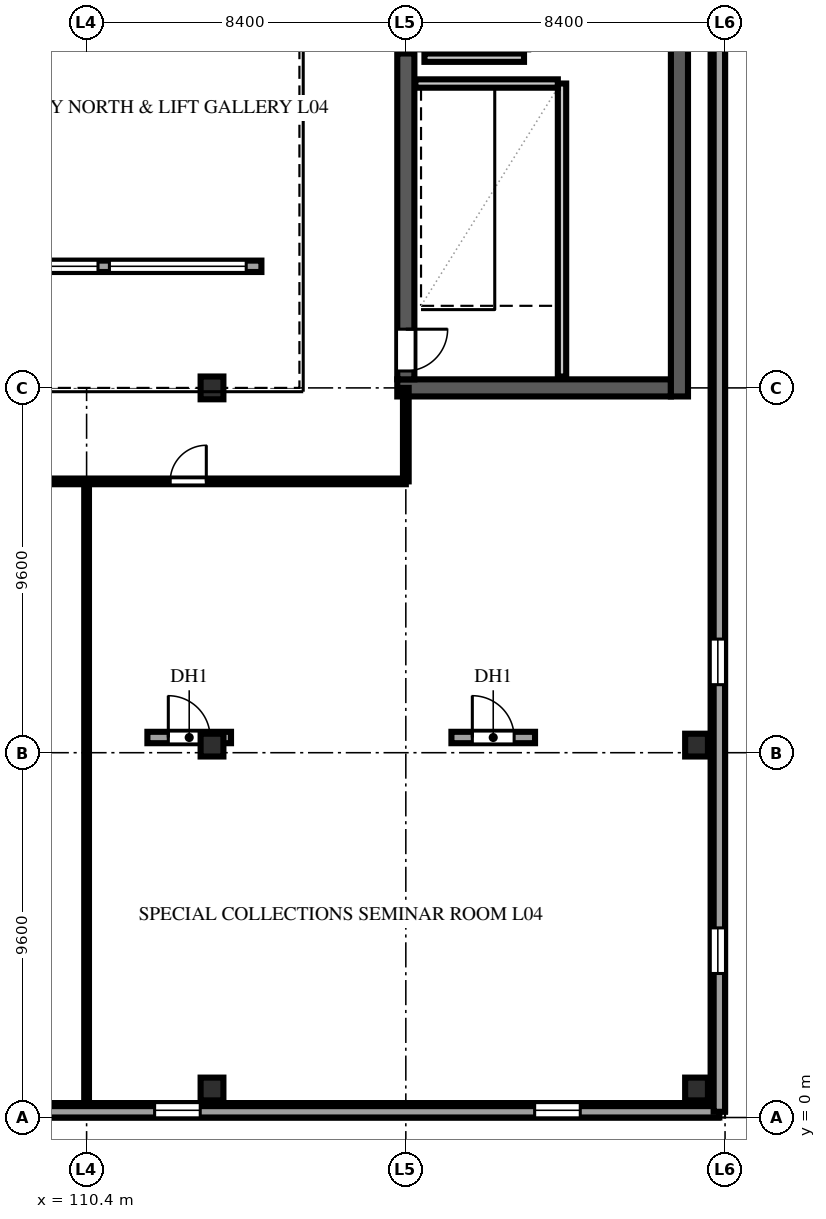
"""IFC4 building model, lengths in metres.
Left out: names, types, materials, properties, quantities, classifications, styles, units other than length and angle.
Written with IfcOpenShell. Run it as: python <this file> out.ifc"""

import sys

from ifc_helpers import new_model, si_unit, direction, frame, frame_2d, origin, origin_2d, place, context, subcontext, project, spatial, rectangle, extrude, element, fill, save


model = new_model("IFC4")
c1 = context("Model", 3, precision=1e-05, world=origin(), true_north=direction((0.0, 1.0)))
c2 = subcontext(c1, "Body", "Model", "MODEL_VIEW")
j1 = project(units=[si_unit("LENGTHUNIT", "METRE"), si_unit("PLANEANGLEUNIT", "RADIAN")], contexts=[c1])
p1 = place(None, origin())
s1 = spatial("IfcSite", under=j1, at=p1, CompositionType="ELEMENT")
p2 = place(p1, origin())
s2 = spatial("IfcBuilding", under=s1, at=p2, CompositionType="ELEMENT")
p3 = place(p2, frame((0.0, 0.0, 19.6)))
s3 = spatial("IfcBuildingStorey", under=s2, at=p3, CompositionType="ELEMENT", Elevation=19.6)
p4 = place(p3, frame((118.575, 19.2, 0.0), z_axis=(0.0, 0.0, 1.0), x_axis=(1.0, 0.0, 0.0)))
e1 = element("IfcWall", 1, at=p4, inside=s3, PredefinedType="SHEAR", context=c2, shape_type="SweptSolid", body=[
    extrude(rectangle(XDim=7.2, YDim=0.45, at=frame_2d((3.6, 0.0))), origin(), (0.0, 0.0, 1.0), 4.32),
])
p5 = place(p3, frame((126.0, 18.975, 0.0), z_axis=(0.0, 0.0, 1.0), x_axis=(0.0, 1.0, 0.0)))
e2 = element("IfcWall", 2, at=p5, inside=s3, PredefinedType="SHEAR", context=c2, shape_type="SweptSolid", body=[
    extrude(rectangle(XDim=19.65, YDim=0.45, at=frame_2d((9.825, 0.0))), origin(), (0.0, 0.0, 1.0), 4.32),
])
p6 = place(p3, frame((118.8, 19.425, 0.0), z_axis=(0.0, 0.0, 1.0), x_axis=(0.0, 1.0, 0.0)))
e3 = element("IfcWall", 3, at=p6, inside=s3, PredefinedType="SHEAR", context=c2, shape_type="SweptSolid", body=[
    extrude(rectangle(XDim=8.575, YDim=0.45, at=frame_2d((4.288, 0.0))), origin(), (0.0, 0.0, 1.0), 4.32),
])
p7 = place(p6, frame((0.22, 0.0, 0.0)))
e4 = element("IfcOpeningElement", 4, at=p7, cuts=e3, PredefinedType="OPENING", context=c2, shape_type="SweptSolid", body=[
    extrude(rectangle(XDim=1.1, YDim=2.2, at=frame_2d((0.55, 1.1))), frame((0.0, 0.237, 0.0), z_axis=(0.0, -1.0, 0.0), x_axis=(1.0, 0.0, 0.0)), (0.0, 0.0, 1.0), 0.474),
])
for number, where, z_axis, x_axis in (
    (5, (113.7, 0.75, 0.0), (0.0, 0.0, 1.0), (1.0, 0.0, 0.0)),
    (6, (113.7, 9.8, 0.0), (0.0, 0.0, 1.0), (1.0, 0.0, 0.0)),
    (7, (113.7, 19.2, 0.0), (0.0, 0.0, 1.0), (1.0, 0.0, 0.0)),
    (8, (126.45, 0.75, 0.0), (0.0, 0.0, 1.0), (1.0, 0.0, 0.0)),
    (9, (126.45, 9.8, 0.0), (0.0, 0.0, 1.0), (1.0, 0.0, 0.0)),
):
    element("IfcColumn", number, at=place(p3, frame(where, z_axis=z_axis, x_axis=x_axis)), inside=s3, PredefinedType="COLUMN", context=c2, shape_type="SweptSolid", body=[
        extrude(rectangle(XDim=0.6, YDim=0.6, at=origin_2d()), origin(), (0.0, 0.0, 1.0), 4.32),
    ])
p8 = place(p3, frame((85.39, 0.19, 0.0), z_axis=(0.0, 0.0, 1.0), x_axis=(1.0, 0.0, 0.0)))
e10 = element("IfcWall", 10, at=p8, inside=s3, PredefinedType="SOLIDWALL", context=c2, shape_type="SweptSolid", body=[
    extrude(rectangle(XDim=41.62, YDim=0.38, at=frame_2d((20.81, 0.0))), origin(), (0.0, 0.0, 1.0), 4.32),
])
p9 = place(p8, frame((5.0, 0.0, 1.25)))
e11 = element("IfcOpeningElement", 11, at=p9, cuts=e10, PredefinedType="OPENING", context=c2, shape_type="SweptSolid", body=[
    extrude(rectangle(XDim=1.2, YDim=1.65, at=frame_2d((0.6, 0.825))), frame((0.0, 0.202, 0.0), z_axis=(0.0, -1.0, 0.0), x_axis=(1.0, 0.0, 0.0)), (0.0, 0.0, 1.0), 0.404),
])
p10 = place(p8, frame((11.8, 0.0, 1.25)))
e12 = element("IfcOpeningElement", 12, at=p10, cuts=e10, PredefinedType="OPENING", context=c2, shape_type="SweptSolid", body=[
    extrude(rectangle(XDim=1.2, YDim=1.65, at=frame_2d((0.6, 0.825))), frame((0.0, 0.202, 0.0), z_axis=(0.0, -1.0, 0.0), x_axis=(1.0, 0.0, 0.0)), (0.0, 0.0, 1.0), 0.404),
])
p11 = place(p8, frame((20.2, 0.0, 1.25)))
e13 = element("IfcOpeningElement", 13, at=p11, cuts=e10, PredefinedType="OPENING", context=c2, shape_type="SweptSolid", body=[
    extrude(rectangle(XDim=1.2, YDim=1.65, at=frame_2d((0.6, 0.825))), frame((0.0, 0.202, 0.0), z_axis=(0.0, -1.0, 0.0), x_axis=(1.0, 0.0, 0.0)), (0.0, 0.0, 1.0), 0.404),
])
p12 = place(p8, frame((26.8, 0.0, 1.25)))
e14 = element("IfcOpeningElement", 14, at=p12, cuts=e10, PredefinedType="OPENING", context=c2, shape_type="SweptSolid", body=[
    extrude(rectangle(XDim=1.2, YDim=1.65, at=frame_2d((0.6, 0.825))), frame((0.0, 0.202, 0.0), z_axis=(0.0, -1.0, 0.0), x_axis=(1.0, 0.0, 0.0)), (0.0, 0.0, 1.0), 0.404),
])
p13 = place(p8, frame((36.8, 0.0, 1.25)))
e15 = element("IfcOpeningElement", 15, at=p13, cuts=e10, PredefinedType="OPENING", context=c2, shape_type="SweptSolid", body=[
    extrude(rectangle(XDim=1.2, YDim=1.65, at=frame_2d((0.6, 0.825))), frame((0.0, 0.202, 0.0), z_axis=(0.0, -1.0, 0.0), x_axis=(1.0, 0.0, 0.0)), (0.0, 0.0, 1.0), 0.404),
])
p14 = place(p3, frame((127.01, 0.19, 0.0), z_axis=(0.0, 0.0, 1.0), x_axis=(0.0, 1.0, 0.0)))
e16 = element("IfcWall", 16, at=p14, inside=s3, PredefinedType="SOLIDWALL", context=c2, shape_type="SweptSolid", body=[
    extrude(rectangle(XDim=57.22, YDim=0.38, at=frame_2d((28.61, 0.0))), origin(), (0.0, 0.0, 1.0), 4.32),
])
p15 = place(p14, frame((3.6, 0.0, 1.25)))
e17 = element("IfcOpeningElement", 17, at=p15, cuts=e16, PredefinedType="OPENING", context=c2, shape_type="SweptSolid", body=[
    extrude(rectangle(XDim=1.2, YDim=1.65, at=frame_2d((0.6, 0.825))), frame((0.0, 0.202, 0.0), z_axis=(0.0, -1.0, 0.0), x_axis=(1.0, 0.0, 0.0)), (0.0, 0.0, 1.0), 0.404),
])
p16 = place(p14, frame((11.2, 0.0, 1.25)))
e18 = element("IfcOpeningElement", 18, at=p16, cuts=e16, PredefinedType="OPENING", context=c2, shape_type="SweptSolid", body=[
    extrude(rectangle(XDim=1.2, YDim=1.65, at=frame_2d((0.6, 0.825))), frame((0.0, 0.202, 0.0), z_axis=(0.0, -1.0, 0.0), x_axis=(1.0, 0.0, 0.0)), (0.0, 0.0, 1.0), 0.404),
])
p17 = place(p14, frame((41.6, 0.0, 1.25)))
e19 = element("IfcOpeningElement", 19, at=p17, cuts=e16, PredefinedType="OPENING", context=c2, shape_type="SweptSolid", body=[
    extrude(rectangle(XDim=1.2, YDim=1.65, at=frame_2d((0.6, 0.825))), frame((0.0, 0.202, 0.0), z_axis=(0.0, -1.0, 0.0), x_axis=(1.0, 0.0, 0.0)), (0.0, 0.0, 1.0), 0.404),
])
p18 = place(p14, frame((49.2, 0.0, 1.25)))
e20 = element("IfcOpeningElement", 20, at=p18, cuts=e16, PredefinedType="OPENING", context=c2, shape_type="SweptSolid", body=[
    extrude(rectangle(XDim=1.2, YDim=1.65, at=frame_2d((0.6, 0.825))), frame((0.0, 0.202, 0.0), z_axis=(0.0, -1.0, 0.0), x_axis=(1.0, 0.0, 0.0)), (0.0, 0.0, 1.0), 0.404),
])
p19 = place(p3, frame((85.35, 0.15, 4.6), z_axis=(0.0, 0.0, 1.0), x_axis=(1.0, 0.0, 0.0)))
e21 = element("IfcWall", 21, at=p19, inside=s3, PredefinedType="PARAPET", context=c2, shape_type="SweptSolid", body=[
    extrude(rectangle(XDim=41.7, YDim=0.3, at=frame_2d((20.85, 0.0))), origin(), (0.0, 0.0, 1.0), 1.15),
])
p20 = place(p3, frame((127.05, 0.15, 4.6), z_axis=(0.0, 0.0, 1.0), x_axis=(0.0, 1.0, 0.0)))
e22 = element("IfcWall", 22, at=p20, inside=s3, PredefinedType="PARAPET", context=c2, shape_type="SweptSolid", body=[
    extrude(rectangle(XDim=57.3, YDim=0.3, at=frame_2d((28.65, 0.0))), origin(), (0.0, 0.0, 1.0), 1.15),
])
p21 = place(p3, frame((94.6, 22.4, 4.6), z_axis=(0.0, 0.0, 1.0), x_axis=(1.0, 0.0, 0.0)))
e23 = element("IfcWall", 23, at=p21, inside=s3, PredefinedType="PARAPET", context=c2, shape_type="SweptSolid", body=[
    extrude(rectangle(XDim=20.4, YDim=0.3, at=frame_2d((10.2, 0.0))), origin(), (0.0, 0.0, 1.0), 4.2),
])
p22 = place(p21, frame((0.8, 0.0, 0.25)))
e24 = element("IfcOpeningElement", 24, at=p22, cuts=e23, PredefinedType="OPENING", context=c2, shape_type="SweptSolid", body=[
    extrude(rectangle(XDim=3.6, YDim=3.6, at=frame_2d((1.8, 1.8))), frame((0.0, 0.162, 0.0), z_axis=(0.0, -1.0, 0.0), x_axis=(1.0, 0.0, 0.0)), (0.0, 0.0, 1.0), 0.324),
])
p23 = place(p21, frame((4.7, 0.0, 0.25)))
e25 = element("IfcOpeningElement", 25, at=p23, cuts=e23, PredefinedType="OPENING", context=c2, shape_type="SweptSolid", body=[
    extrude(rectangle(XDim=3.6, YDim=3.6, at=frame_2d((1.8, 1.8))), frame((0.0, 0.162, 0.0), z_axis=(0.0, -1.0, 0.0), x_axis=(1.0, 0.0, 0.0)), (0.0, 0.0, 1.0), 0.324),
])
p24 = place(p21, frame((8.6, 0.0, 0.25)))
e26 = element("IfcOpeningElement", 26, at=p24, cuts=e23, PredefinedType="OPENING", context=c2, shape_type="SweptSolid", body=[
    extrude(rectangle(XDim=3.6, YDim=3.6, at=frame_2d((1.8, 1.8))), frame((0.0, 0.162, 0.0), z_axis=(0.0, -1.0, 0.0), x_axis=(1.0, 0.0, 0.0)), (0.0, 0.0, 1.0), 0.324),
])
p25 = place(p21, frame((12.5, 0.0, 0.25)))
e27 = element("IfcOpeningElement", 27, at=p25, cuts=e23, PredefinedType="OPENING", context=c2, shape_type="SweptSolid", body=[
    extrude(rectangle(XDim=3.6, YDim=3.6, at=frame_2d((1.8, 1.8))), frame((0.0, 0.162, 0.0), z_axis=(0.0, -1.0, 0.0), x_axis=(1.0, 0.0, 0.0)), (0.0, 0.0, 1.0), 0.324),
])
p26 = place(p21, frame((16.4, 0.0, 0.25)))
e28 = element("IfcOpeningElement", 28, at=p26, cuts=e23, PredefinedType="OPENING", context=c2, shape_type="SweptSolid", body=[
    extrude(rectangle(XDim=3.6, YDim=3.6, at=frame_2d((1.8, 1.8))), frame((0.0, 0.162, 0.0), z_axis=(0.0, -1.0, 0.0), x_axis=(1.0, 0.0, 0.0)), (0.0, 0.0, 1.0), 0.324),
])
p27 = place(p3, frame((112.0, 10.0, 4.9), z_axis=(0.0, 0.0, 1.0), x_axis=(1.0, 0.0, 0.0)))
e29 = element("IfcWall", 29, at=p27, inside=s3, PredefinedType="PARAPET", context=c2, shape_type="SweptSolid", body=[
    extrude(rectangle(XDim=2.2, YDim=0.3, at=frame_2d((1.1, 0.0))), origin(), (0.0, 0.0, 1.0), 1.8),
])
p28 = place(p27, frame((0.55, 0.0, 0.2)))
e30 = element("IfcOpeningElement", 30, at=p28, cuts=e29, PredefinedType="OPENING", context=c2, shape_type="SweptSolid", body=[
    extrude(rectangle(XDim=1.1, YDim=1.4, at=frame_2d((0.55, 0.7))), frame((0.0, 0.162, 0.0), z_axis=(0.0, -1.0, 0.0), x_axis=(1.0, 0.0, 0.0)), (0.0, 0.0, 1.0), 0.324),
])
p29 = place(p3, frame((120.0, 10.0, 4.9), z_axis=(0.0, 0.0, 1.0), x_axis=(1.0, 0.0, 0.0)))
e31 = element("IfcWall", 31, at=p29, inside=s3, PredefinedType="PARAPET", context=c2, shape_type="SweptSolid", body=[
    extrude(rectangle(XDim=2.2, YDim=0.3, at=frame_2d((1.1, 0.0))), origin(), (0.0, 0.0, 1.0), 1.8),
])
p30 = place(p29, frame((0.55, 0.0, 0.2)))
e32 = element("IfcOpeningElement", 32, at=p30, cuts=e31, PredefinedType="OPENING", context=c2, shape_type="SweptSolid", body=[
    extrude(rectangle(XDim=1.1, YDim=1.4, at=frame_2d((0.55, 0.7))), frame((0.0, 0.162, 0.0), z_axis=(0.0, -1.0, 0.0), x_axis=(1.0, 0.0, 0.0)), (0.0, 0.0, 1.0), 0.324),
])
p31 = place(p3, frame((122.91, 19.5, 0.0), z_axis=(0.0, 0.0, 1.0), x_axis=(0.0, 1.0, 0.0)))
e33 = element("IfcWall", 33, at=p31, inside=s3, PredefinedType="SOLIDWALL", context=c2, shape_type="SweptSolid", body=[
    extrude(rectangle(XDim=7.71, YDim=0.22, at=frame_2d((3.855, 0.0))), origin(), (0.0, 0.0, 1.0), 4.32),
])
p32 = place(p3, frame((119.05, 27.21, 0.0), z_axis=(0.0, 0.0, 1.0), x_axis=(1.0, 0.0, 0.0)))
e34 = element("IfcWall", 34, at=p32, inside=s3, PredefinedType="SOLIDWALL", context=c2, shape_type="SweptSolid", body=[
    extrude(rectangle(XDim=3.75, YDim=0.22, at=frame_2d((1.875, 0.0))), origin(), (0.0, 0.0, 1.0), 4.32),
])
p33 = place(p3, frame((119.29, 27.89, 0.0), z_axis=(0.0, 0.0, 1.0), x_axis=(1.0, 0.0, 0.0)))
e35 = element("IfcWall", 35, at=p33, inside=s3, PredefinedType="SOLIDWALL", context=c2, shape_type="SweptSolid", body=[
    extrude(rectangle(XDim=2.62, YDim=0.22, at=frame_2d((1.31, 0.0))), origin(), (0.0, 0.0, 1.0), 4.32),
])
p34 = place(p3, frame((110.4, 0.35, 0.0), z_axis=(0.0, 0.0, 1.0), x_axis=(0.0, 1.0, 0.0)))
e36 = element("IfcWall", 36, at=p34, inside=s3, PredefinedType="PARTITIONING", context=c2, shape_type="SweptSolid", body=[
    extrude(rectangle(XDim=16.39, YDim=0.125, at=frame_2d((8.195, 0.0))), origin(), (0.0, 0.0, 1.0), 4.32),
])
p35 = place(p3, frame((118.8, 16.74, 0.0), z_axis=(0.0, 0.0, 1.0), x_axis=(0.0, 1.0, 0.0)))
e37 = element("IfcWall", 37, at=p35, inside=s3, PredefinedType="PARTITIONING", context=c2, shape_type="SweptSolid", body=[
    extrude(rectangle(XDim=2.46, YDim=0.15, at=frame_2d((1.23, 0.0))), origin(), (0.0, 0.0, 1.0), 4.32),
])
p36 = place(p3, frame((93.6, 16.74, 0.0), z_axis=(0.0, 0.0, 1.0), x_axis=(1.0, 0.0, 0.0)))
e38 = element("IfcWall", 38, at=p36, inside=s3, PredefinedType="PARTITIONING", context=c2, shape_type="SweptSolid", body=[
    extrude(rectangle(XDim=25.2, YDim=0.15, at=frame_2d((12.6, 0.0))), origin(), (0.0, 0.0, 1.0), 4.32),
])
p37 = place(p36, frame((4.0, 0.0, 0.0)))
e39 = element("IfcOpeningElement", 39, at=p37, cuts=e38, PredefinedType="OPENING", context=c2, shape_type="SweptSolid", body=[
    extrude(rectangle(XDim=1.0, YDim=2.2, at=frame_2d((0.5, 1.1))), frame((0.0, 0.087, 0.0), z_axis=(0.0, -1.0, 0.0), x_axis=(1.0, 0.0, 0.0)), (0.0, 0.0, 1.0), 0.174),
])
p38 = place(p36, frame((19.0, 0.0, 0.0)))
e40 = element("IfcOpeningElement", 40, at=p38, cuts=e38, PredefinedType="OPENING", context=c2, shape_type="SweptSolid", body=[
    extrude(rectangle(XDim=0.95, YDim=2.15, at=frame_2d((0.475, 1.075))), frame((0.0, 0.087, 0.0), z_axis=(0.0, -1.0, 0.0), x_axis=(1.0, 0.0, 0.0)), (0.0, 0.0, 1.0), 0.174),
])
p39 = place(p12, origin())
e41 = element("IfcWindow", 41, at=p39, inside=s3, PartitioningType="SINGLE_PANEL", PredefinedType="WINDOW", context=c2, shape_type="SweptSolid", body=[
    extrude(rectangle(XDim=1.2, YDim=1.65, at=frame_2d((0.6, 0.825))), frame((0.0, 0.11, 0.0), z_axis=(0.0, -1.0, 0.0), x_axis=(1.0, 0.0, 0.0)), (0.0, 0.0, 1.0), 0.06),
])
fill(e14, e41)
p40 = place(p13, origin())
e42 = element("IfcWindow", 42, at=p40, inside=s3, PartitioningType="SINGLE_PANEL", PredefinedType="WINDOW", context=c2, shape_type="SweptSolid", body=[
    extrude(rectangle(XDim=1.2, YDim=1.65, at=frame_2d((0.6, 0.825))), frame((0.0, 0.11, 0.0), z_axis=(0.0, -1.0, 0.0), x_axis=(1.0, 0.0, 0.0)), (0.0, 0.0, 1.0), 0.06),
])
fill(e15, e42)
p41 = place(p15, origin())
e43 = element("IfcWindow", 43, at=p41, inside=s3, PartitioningType="SINGLE_PANEL", PredefinedType="WINDOW", context=c2, shape_type="SweptSolid", body=[
    extrude(rectangle(XDim=1.2, YDim=1.65, at=frame_2d((0.6, 0.825))), frame((0.0, 0.11, 0.0), z_axis=(0.0, -1.0, 0.0), x_axis=(1.0, 0.0, 0.0)), (0.0, 0.0, 1.0), 0.06),
])
fill(e17, e43)
p42 = place(p16, origin())
e44 = element("IfcWindow", 44, at=p42, inside=s3, PartitioningType="SINGLE_PANEL", PredefinedType="WINDOW", context=c2, shape_type="SweptSolid", body=[
    extrude(rectangle(XDim=1.2, YDim=1.65, at=frame_2d((0.6, 0.825))), frame((0.0, 0.11, 0.0), z_axis=(0.0, -1.0, 0.0), x_axis=(1.0, 0.0, 0.0)), (0.0, 0.0, 1.0), 0.06),
])
fill(e18, e44)
p43 = place(p25, origin())
e45 = element("IfcWindow", 45, at=p43, inside=s3, PartitioningType="SINGLE_PANEL", PredefinedType="SKYLIGHT", context=c2, shape_type="SweptSolid", body=[
    extrude(rectangle(XDim=3.6, YDim=3.6, at=frame_2d((1.8, 1.8))), frame((0.0, 0.03, 0.0), z_axis=(0.0, -1.0, 0.0), x_axis=(1.0, 0.0, 0.0)), (0.0, 0.0, 1.0), 0.06),
])
fill(e27, e45)
p44 = place(p26, origin())
e46 = element("IfcWindow", 46, at=p44, inside=s3, PartitioningType="SINGLE_PANEL", PredefinedType="SKYLIGHT", context=c2, shape_type="SweptSolid", body=[
    extrude(rectangle(XDim=3.6, YDim=3.6, at=frame_2d((1.8, 1.8))), frame((0.0, 0.03, 0.0), z_axis=(0.0, -1.0, 0.0), x_axis=(1.0, 0.0, 0.0)), (0.0, 0.0, 1.0), 0.06),
])
fill(e28, e46)
p45 = place(p28, origin())
e47 = element("IfcDoor", 47, at=p45, inside=s3, OperationType="SINGLE_SWING_LEFT", PredefinedType="TRAPDOOR", context=c2, shape_type="SweptSolid", body=[
    extrude(rectangle(XDim=1.1, YDim=1.4, at=frame_2d((0.55, 0.7))), frame((0.0, 0.025, 0.0), z_axis=(0.0, -1.0, 0.0), x_axis=(1.0, 0.0, 0.0)), (0.0, 0.0, 1.0), 0.05),
])
fill(e30, e47)
p46 = place(p30, origin())
e48 = element("IfcDoor", 48, at=p46, inside=s3, OperationType="SINGLE_SWING_LEFT", PredefinedType="TRAPDOOR", context=c2, shape_type="SweptSolid", body=[
    extrude(rectangle(XDim=1.1, YDim=1.4, at=frame_2d((0.55, 0.7))), frame((0.0, 0.025, 0.0), z_axis=(0.0, -1.0, 0.0), x_axis=(1.0, 0.0, 0.0)), (0.0, 0.0, 1.0), 0.05),
])
fill(e32, e48)
p47 = place(p7, frame((1.1, 0.0, 0.0), z_axis=(0.0, 0.0, 1.0), x_axis=(-1.0, 0.0, 0.0)))
e49 = element("IfcDoor", 49, at=p47, inside=s3, OperationType="SINGLE_SWING_LEFT", PredefinedType="DOOR", context=c2, shape_type="SweptSolid", body=[
    extrude(rectangle(XDim=1.1, YDim=2.2, at=frame_2d((0.55, 1.1))), frame((0.0, 0.025, 0.0), z_axis=(0.0, -1.0, 0.0), x_axis=(1.0, 0.0, 0.0)), (0.0, 0.0, 1.0), 0.05),
])
fill(e4, e49)
p48 = place(p38, origin())
e50 = element("IfcDoor", 50, at=p48, inside=s3, OperationType="SINGLE_SWING_RIGHT", PredefinedType="DOOR", context=c2, shape_type="SweptSolid", body=[
    extrude(rectangle(XDim=0.95, YDim=2.15, at=frame_2d((0.475, 1.075))), frame((0.0, 0.025, 0.0), z_axis=(0.0, -1.0, 0.0), x_axis=(1.0, 0.0, 0.0)), (0.0, 0.0, 1.0), 0.05),
])
fill(e40, e50)
save(model, sys.argv[1])
